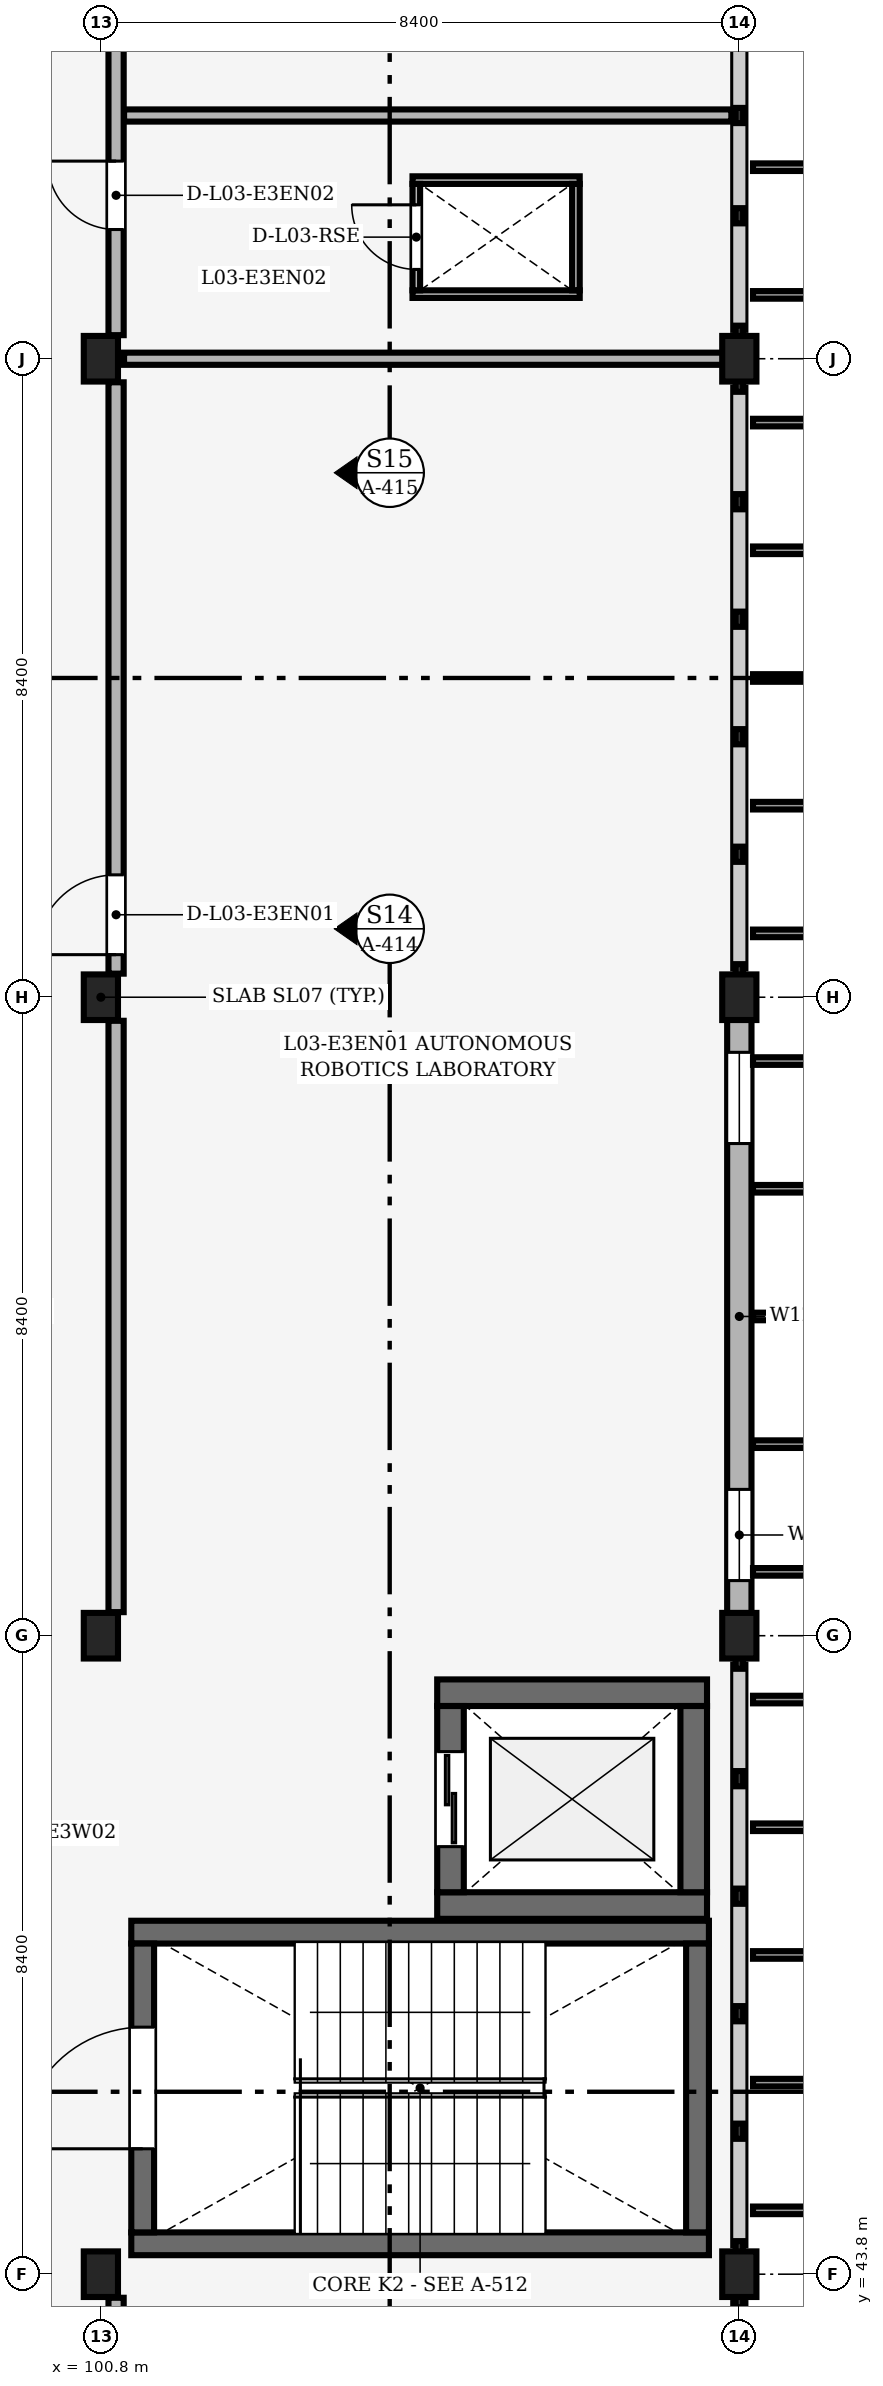
"""IFC4 building model, lengths in metres.
Left out: names, types, materials, properties, quantities, classifications, styles, units other than length and angle.
Written with IfcOpenShell. Run it as: python <this file> out.ifc"""

import sys

from ifc_helpers import new_model, si_unit, direction, frame, frame_2d, origin, origin_2d, place, context, subcontext, project, spatial, rectangle, extrude, element, fill, save


model = new_model("IFC4")
c1 = context("Model", 3, precision=1e-05, world=origin(), true_north=direction((0.0, 1.0)))
c2 = subcontext(c1, "Body", "Model", "MODEL_VIEW")
j1 = project(units=[si_unit("LENGTHUNIT", "METRE"), si_unit("PLANEANGLEUNIT", "RADIAN")], contexts=[c1])
p1 = place(None, origin())
s1 = spatial("IfcSite", under=j1, at=p1, CompositionType="ELEMENT")
p2 = place(p1, origin())
s2 = spatial("IfcBuilding", under=s1, at=p2, CompositionType="ELEMENT")
p3 = place(p2, frame((0.0, 0.0, 13.2)))
s3 = spatial("IfcBuildingStorey", under=s2, at=p3, CompositionType="ELEMENT", Elevation=13.2)
for number, where, z_axis, x_axis in (
    (1, (100.8, 43.8, 0.0), (0.0, 0.0, 1.0), (1.0, 0.0, 0.0)),
    (2, (100.8, 52.2, 0.0), (0.0, 0.0, 1.0), (1.0, 0.0, 0.0)),
    (3, (100.8, 60.6, 0.0), (0.0, 0.0, 1.0), (1.0, 0.0, 0.0)),
    (4, (100.8, 69.0, 0.0), (0.0, 0.0, 1.0), (1.0, 0.0, 0.0)),
    (5, (109.2, 43.8, 0.0), (0.0, 0.0, 1.0), (1.0, 0.0, 0.0)),
    (6, (109.2, 52.2, 0.0), (0.0, 0.0, 1.0), (1.0, 0.0, 0.0)),
    (7, (109.2, 60.6, 0.0), (0.0, 0.0, 1.0), (1.0, 0.0, 0.0)),
    (8, (109.2, 69.0, 0.0), (0.0, 0.0, 1.0), (1.0, 0.0, 0.0)),
):
    element("IfcColumn", number, at=place(p3, frame(where, z_axis=z_axis, x_axis=x_axis)), inside=s3, PredefinedType="COLUMN", context=c2, shape_type="SweptSolid", body=[
        extrude(rectangle(XDim=0.45, YDim=0.6, at=origin_2d()), origin(), (0.0, 0.0, 1.0), 4.2),
    ])
p4 = place(p3, frame((109.2, 52.475, 0.0), z_axis=(0.0, 0.0, 1.0), x_axis=(0.0, 1.0, 0.0)))
e9 = element("IfcWall", 9, at=p4, inside=s3, PredefinedType="SOLIDWALL", context=c2, shape_type="SweptSolid", body=[
    extrude(rectangle(XDim=7.85, YDim=0.32, at=frame_2d((3.925, 0.0))), origin(), (0.0, 0.0, 1.0), 3.04),
])
p5 = place(p4, frame((0.45, 0.0, 0.85)))
e10 = element("IfcOpeningElement", 10, at=p5, cuts=e9, PredefinedType="OPENING", context=c2, shape_type="SweptSolid", body=[
    extrude(rectangle(XDim=1.2, YDim=1.8, at=frame_2d((0.6, 0.9))), frame((0.0, 0.17, 0.0), z_axis=(0.0, -1.0, 0.0), x_axis=(1.0, 0.0, 0.0)), (0.0, 0.0, 1.0), 0.34),
])
p6 = place(p4, frame((6.2, 0.0, 0.85)))
e11 = element("IfcOpeningElement", 11, at=p6, cuts=e9, PredefinedType="OPENING", context=c2, shape_type="SweptSolid", body=[
    extrude(rectangle(XDim=1.2, YDim=1.8, at=frame_2d((0.6, 0.9))), frame((0.0, 0.17, 0.0), z_axis=(0.0, -1.0, 0.0), x_axis=(1.0, 0.0, 0.0)), (0.0, 0.0, 1.0), 0.34),
])
for number, where, z_axis, x_axis in (
    (12, (101.2, 44.2, 0.0), (0.0, 0.0, 1.0), (1.0, 0.0, 0.0)),
    (13, (101.2, 48.3, 0.0), (0.0, 0.0, 1.0), (1.0, 0.0, 0.0)),
):
    element("IfcWall", number, at=place(p3, frame(where, z_axis=z_axis, x_axis=x_axis)), inside=s3, PredefinedType="SHEAR", context=c2, shape_type="SweptSolid", body=[
        extrude(rectangle(XDim=7.6, YDim=0.3, at=frame_2d((3.8, 0.0))), origin(), (0.0, 0.0, 1.0), 4.025),
    ])
p7 = place(p3, frame((101.35, 44.35, 0.0), z_axis=(0.0, 0.0, 1.0), x_axis=(0.0, 1.0, 0.0)))
e14 = element("IfcWall", 14, at=p7, inside=s3, PredefinedType="SHEAR", context=c2, shape_type="SweptSolid", body=[
    extrude(rectangle(XDim=3.8, YDim=0.3, at=frame_2d((1.9, 0.0))), origin(), (0.0, 0.0, 1.0), 4.025),
])
p8 = place(p7, frame((1.1, 0.0, 0.0)))
e15 = element("IfcOpeningElement", 15, at=p8, cuts=e14, PredefinedType="OPENING", context=c2, shape_type="SweptSolid", body=[
    extrude(rectangle(XDim=1.6, YDim=2.2, at=frame_2d((0.8, 1.1))), frame((0.0, 0.16, 0.0), z_axis=(0.0, -1.0, 0.0), x_axis=(1.0, 0.0, 0.0)), (0.0, 0.0, 1.0), 0.32),
])
p9 = place(p3, frame((108.65, 44.35, 0.0), z_axis=(0.0, 0.0, 1.0), x_axis=(0.0, 1.0, 0.0)))
e16 = element("IfcWall", 16, at=p9, inside=s3, PredefinedType="SHEAR", context=c2, shape_type="SweptSolid", body=[
    extrude(rectangle(XDim=3.8, YDim=0.3, at=frame_2d((1.9, 0.0))), origin(), (0.0, 0.0, 1.0), 4.025),
])
for number, where, z_axis, x_axis in (
    (17, (105.225, 48.65, 0.0), (0.0, 0.0, 1.0), (1.0, 0.0, 0.0)),
    (18, (105.225, 51.45, 0.0), (0.0, 0.0, 1.0), (1.0, 0.0, 0.0)),
):
    element("IfcWall", number, at=place(p3, frame(where, z_axis=z_axis, x_axis=x_axis)), inside=s3, PredefinedType="SHEAR", context=c2, shape_type="SweptSolid", body=[
        extrude(rectangle(XDim=3.55, YDim=0.35, at=frame_2d((1.775, 0.0))), origin(), (0.0, 0.0, 1.0), 3.92),
    ])
p10 = place(p3, frame((105.4, 48.825, 0.0), z_axis=(0.0, 0.0, 1.0), x_axis=(0.0, 1.0, 0.0)))
e19 = element("IfcWall", 19, at=p10, inside=s3, PredefinedType="SHEAR", context=c2, shape_type="SweptSolid", body=[
    extrude(rectangle(XDim=2.45, YDim=0.35, at=frame_2d((1.225, 0.0))), origin(), (0.0, 0.0, 1.0), 3.92),
])
p11 = place(p10, frame((0.6, 0.0, 0.0)))
e20 = element("IfcOpeningElement", 20, at=p11, cuts=e19, PredefinedType="OPENING", context=c2, shape_type="SweptSolid", body=[
    extrude(rectangle(XDim=1.25, YDim=2.25, at=frame_2d((0.625, 1.125))), frame((0.0, 0.185, 0.0), z_axis=(0.0, -1.0, 0.0), x_axis=(1.0, 0.0, 0.0)), (0.0, 0.0, 1.0), 0.37),
])
p12 = place(p3, frame((108.6, 48.825, 0.0), z_axis=(0.0, 0.0, 1.0), x_axis=(0.0, 1.0, 0.0)))
e21 = element("IfcWall", 21, at=p12, inside=s3, PredefinedType="SHEAR", context=c2, shape_type="SweptSolid", body=[
    extrude(rectangle(XDim=2.45, YDim=0.35, at=frame_2d((1.225, 0.0))), origin(), (0.0, 0.0, 1.0), 3.92),
])
for number, where, z_axis, x_axis in (
    (22, (104.9, 69.85, 0.0), (0.0, 0.0, 1.0), (1.0, 0.0, 0.0)),
    (23, (104.9, 71.35, 0.0), (0.0, 0.0, 1.0), (1.0, 0.0, 0.0)),
):
    element("IfcWall", number, at=place(p3, frame(where, z_axis=z_axis, x_axis=x_axis)), inside=s3, PredefinedType="PARTITIONING", context=c2, shape_type="SweptSolid", body=[
        extrude(rectangle(XDim=2.2, YDim=0.1, at=frame_2d((1.1, 0.0))), origin(), (0.0, 0.0, 1.0), 3.9),
    ])
p13 = place(p3, frame((104.95, 69.9, 0.0), z_axis=(0.0, 0.0, 1.0), x_axis=(0.0, 1.0, 0.0)))
e24 = element("IfcWall", 24, at=p13, inside=s3, PredefinedType="PARTITIONING", context=c2, shape_type="SweptSolid", body=[
    extrude(rectangle(XDim=1.4, YDim=0.1, at=frame_2d((0.7, 0.0))), origin(), (0.0, 0.0, 1.0), 3.9),
])
p14 = place(p13, frame((0.275, 0.0, 0.0)))
e25 = element("IfcOpeningElement", 25, at=p14, cuts=e24, PredefinedType="OPENING", context=c2, shape_type="SweptSolid", body=[
    extrude(rectangle(XDim=0.85, YDim=2.05, at=frame_2d((0.425, 1.025))), frame((0.0, 0.06, 0.0), z_axis=(0.0, -1.0, 0.0), x_axis=(1.0, 0.0, 0.0)), (0.0, 0.0, 1.0), 0.12),
])
p15 = place(p3, frame((107.05, 69.9, 0.0), z_axis=(0.0, 0.0, 1.0), x_axis=(0.0, 1.0, 0.0)))
e26 = element("IfcWall", 26, at=p15, inside=s3, PredefinedType="PARTITIONING", context=c2, shape_type="SweptSolid", body=[
    extrude(rectangle(XDim=1.4, YDim=0.1, at=frame_2d((0.7, 0.0))), origin(), (0.0, 0.0, 1.0), 3.9),
])
p16 = place(p3, frame((101.0, 35.565, 0.0), z_axis=(0.0, 0.0, 1.0), x_axis=(0.0, 1.0, 0.0)))
e27 = element("IfcWall", 27, at=p16, inside=s3, PredefinedType="PARTITIONING", context=c2, shape_type="SweptSolid", body=[
    extrude(rectangle(XDim=7.925, YDim=0.2, at=frame_2d((3.962, 0.0))), origin(), (0.0, 0.0, 1.0), 3.43),
])
p17 = place(p16, frame((3.51, 0.0, 0.0)))
e28 = element("IfcOpeningElement", 28, at=p17, cuts=e27, PredefinedType="OPENING", context=c2, shape_type="SweptSolid", body=[
    extrude(rectangle(XDim=1.05, YDim=2.2, at=frame_2d((0.525, 1.1))), frame((0.0, 0.11, 0.0), z_axis=(0.0, -1.0, 0.0), x_axis=(1.0, 0.0, 0.0)), (0.0, 0.0, 1.0), 0.22),
])
p18 = place(p3, frame((101.105, 69.0, 0.0), z_axis=(0.0, 0.0, 1.0), x_axis=(1.0, 0.0, 0.0)))
e29 = element("IfcWall", 29, at=p18, inside=s3, PredefinedType="PARTITIONING", context=c2, shape_type="SweptSolid", body=[
    extrude(rectangle(XDim=7.99, YDim=0.16, at=frame_2d((3.995, 0.0))), origin(), (0.0, 0.0, 1.0), 3.34),
])
p19 = place(p3, frame((101.105, 72.2, 0.0), z_axis=(0.0, 0.0, 1.0), x_axis=(1.0, 0.0, 0.0)))
e30 = element("IfcWall", 30, at=p19, inside=s3, PredefinedType="PARTITIONING", context=c2, shape_type="SweptSolid", body=[
    extrude(rectangle(XDim=7.99, YDim=0.16, at=frame_2d((3.995, 0.0))), origin(), (0.0, 0.0, 1.0), 3.9),
])
p20 = place(p3, frame((101.0, 52.51, 0.0), z_axis=(0.0, 0.0, 1.0), x_axis=(0.0, 1.0, 0.0)))
e31 = element("IfcWall", 31, at=p20, inside=s3, PredefinedType="PARTITIONING", context=c2, shape_type="SweptSolid", body=[
    extrude(rectangle(XDim=7.78, YDim=0.2, at=frame_2d((3.89, 0.0))), origin(), (0.0, 0.0, 1.0), 3.24),
])
p21 = place(p3, frame((101.0, 60.91, 0.0), z_axis=(0.0, 0.0, 1.0), x_axis=(0.0, 1.0, 0.0)))
e32 = element("IfcWall", 32, at=p21, inside=s3, PredefinedType="PARTITIONING", context=c2, shape_type="SweptSolid", body=[
    extrude(rectangle(XDim=7.78, YDim=0.2, at=frame_2d((3.89, 0.0))), origin(), (0.0, 0.0, 1.0), 3.29),
])
p22 = place(p21, frame((0.25, 0.0, 0.0)))
e33 = element("IfcOpeningElement", 33, at=p22, cuts=e32, PredefinedType="OPENING", context=c2, shape_type="SweptSolid", body=[
    extrude(rectangle(XDim=1.05, YDim=2.2, at=frame_2d((0.525, 1.1))), frame((0.0, 0.11, 0.0), z_axis=(0.0, -1.0, 0.0), x_axis=(1.0, 0.0, 0.0)), (0.0, 0.0, 1.0), 0.22),
])
p23 = place(p3, frame((101.0, 69.31, 0.0), z_axis=(0.0, 0.0, 1.0), x_axis=(0.0, 1.0, 0.0)))
e34 = element("IfcWall", 34, at=p23, inside=s3, PredefinedType="PARTITIONING", context=c2, shape_type="SweptSolid", body=[
    extrude(rectangle(XDim=7.78, YDim=0.2, at=frame_2d((3.89, 0.0))), origin(), (0.0, 0.0, 1.0), 3.24),
])
p24 = place(p23, frame((1.39, 0.0, 0.0)))
e35 = element("IfcOpeningElement", 35, at=p24, cuts=e34, PredefinedType="OPENING", context=c2, shape_type="SweptSolid", body=[
    extrude(rectangle(XDim=0.9, YDim=2.1, at=frame_2d((0.45, 1.05))), frame((0.0, 0.11, 0.0), z_axis=(0.0, -1.0, 0.0), x_axis=(1.0, 0.0, 0.0)), (0.0, 0.0, 1.0), 0.22),
])
p25 = place(p23, frame((4.965, 0.0, 0.0)))
e36 = element("IfcOpeningElement", 36, at=p25, cuts=e34, PredefinedType="OPENING", context=c2, shape_type="SweptSolid", body=[
    extrude(rectangle(XDim=1.05, YDim=2.2, at=frame_2d((0.525, 1.1))), frame((0.0, 0.11, 0.0), z_axis=(0.0, -1.0, 0.0), x_axis=(1.0, 0.0, 0.0)), (0.0, 0.0, 1.0), 0.22),
])
p26 = place(p5, origin())
e37 = element("IfcWindow", 37, at=p26, inside=s3, PartitioningType="SINGLE_PANEL", PredefinedType="WINDOW", context=c2, shape_type="SweptSolid", body=[
    extrude(rectangle(XDim=1.2, YDim=1.8, at=frame_2d((0.6, 0.9))), frame((0.0, 0.03, 0.0), z_axis=(0.0, -1.0, 0.0), x_axis=(1.0, 0.0, 0.0)), (0.0, 0.0, 1.0), 0.06),
])
fill(e10, e37)
p27 = place(p6, origin())
e38 = element("IfcWindow", 38, at=p27, inside=s3, PartitioningType="SINGLE_PANEL", PredefinedType="WINDOW", context=c2, shape_type="SweptSolid", body=[
    extrude(rectangle(XDim=1.2, YDim=1.8, at=frame_2d((0.6, 0.9))), frame((0.0, 0.03, 0.0), z_axis=(0.0, -1.0, 0.0), x_axis=(1.0, 0.0, 0.0)), (0.0, 0.0, 1.0), 0.06),
])
fill(e11, e38)
p28 = place(p8, origin())
e39 = element("IfcDoor", 39, at=p28, inside=s3, OperationType="DOUBLE_DOOR_SINGLE_SWING", PredefinedType="DOOR", context=c2, shape_type="SweptSolid", body=[
    extrude(rectangle(XDim=1.6, YDim=2.2, at=frame_2d((0.8, 1.1))), frame((0.0, 0.025, 0.0), z_axis=(0.0, -1.0, 0.0), x_axis=(1.0, 0.0, 0.0)), (0.0, 0.0, 1.0), 0.05),
])
fill(e15, e39)
p29 = place(p11, origin())
e40 = element("IfcDoor", 40, at=p29, inside=s3, OperationType="DOUBLE_DOOR_SLIDING", PredefinedType="DOOR", context=c2, shape_type="SweptSolid", body=[
    extrude(rectangle(XDim=1.25, YDim=2.25, at=frame_2d((0.625, 1.125))), frame((0.0, 0.025, 0.0), z_axis=(0.0, -1.0, 0.0), x_axis=(1.0, 0.0, 0.0)), (0.0, 0.0, 1.0), 0.05),
])
fill(e20, e40)
p30 = place(p14, origin())
e41 = element("IfcDoor", 41, at=p30, inside=s3, OperationType="SINGLE_SWING_RIGHT", PredefinedType="DOOR", context=c2, shape_type="SweptSolid", body=[
    extrude(rectangle(XDim=0.85, YDim=2.05, at=frame_2d((0.425, 1.025))), frame((0.0, 0.025, 0.0), z_axis=(0.0, -1.0, 0.0), x_axis=(1.0, 0.0, 0.0)), (0.0, 0.0, 1.0), 0.05),
])
fill(e25, e41)
p31 = place(p22, origin())
e42 = element("IfcDoor", 42, at=p31, inside=s3, OperationType="SINGLE_SWING_LEFT", PredefinedType="DOOR", context=c2, shape_type="SweptSolid", body=[
    extrude(rectangle(XDim=1.05, YDim=2.2, at=frame_2d((0.525, 1.1))), frame((0.0, 0.025, 0.0), z_axis=(0.0, -1.0, 0.0), x_axis=(1.0, 0.0, 0.0)), (0.0, 0.0, 1.0), 0.05),
])
fill(e33, e42)
p32 = place(p24, origin())
e43 = element("IfcDoor", 43, at=p32, inside=s3, OperationType="SINGLE_SWING_RIGHT", PredefinedType="DOOR", context=c2, shape_type="SweptSolid", body=[
    extrude(rectangle(XDim=0.9, YDim=2.1, at=frame_2d((0.45, 1.05))), frame((0.0, 0.025, 0.0), z_axis=(0.0, -1.0, 0.0), x_axis=(1.0, 0.0, 0.0)), (0.0, 0.0, 1.0), 0.05),
])
fill(e35, e43)
save(model, sys.argv[1])
